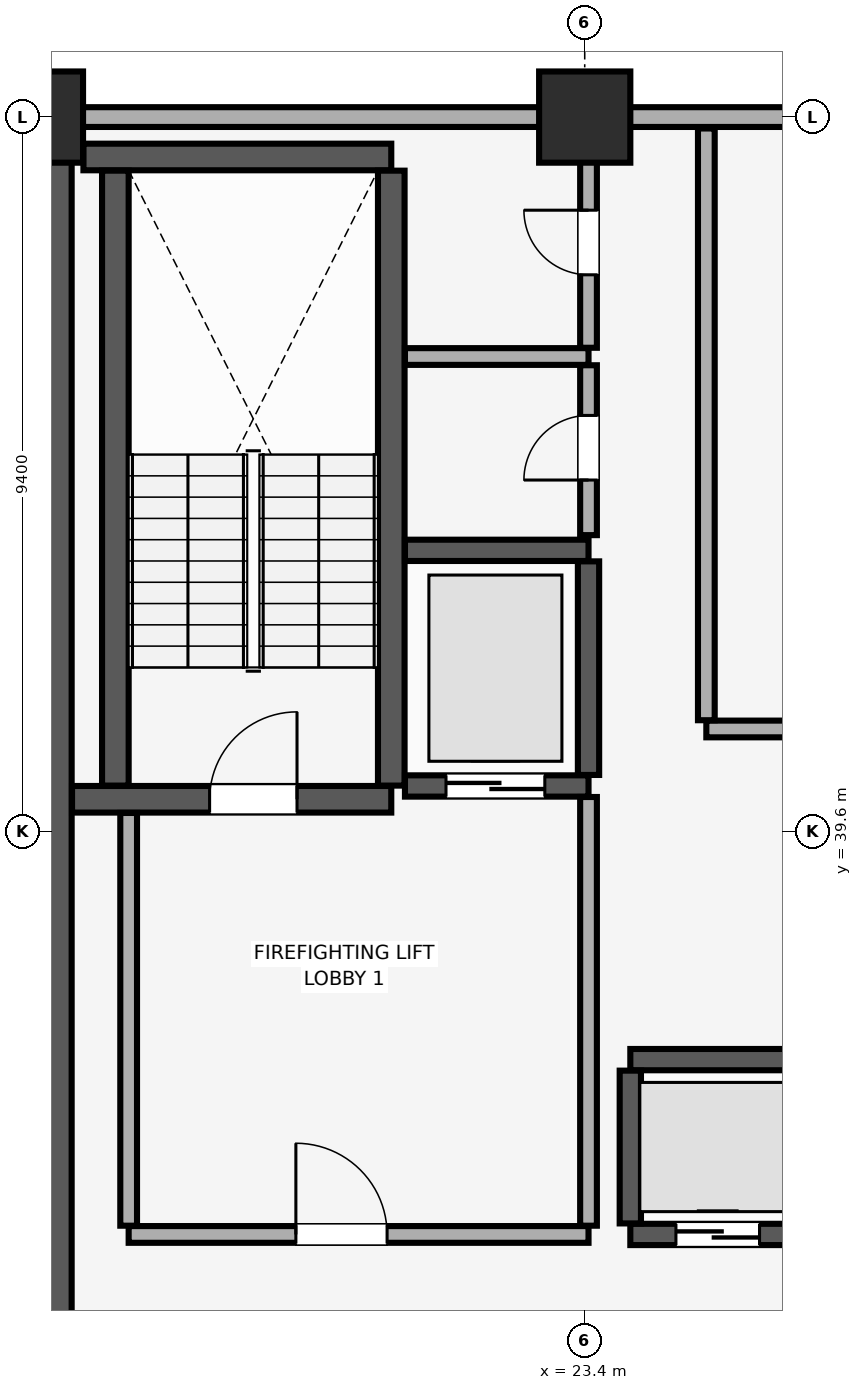
"""IFC4 building model, lengths in metres.
Left out: names, types, materials, properties, quantities, classifications, styles, units other than length and angle.
Written with IfcOpenShell. Run it as: python <this file> out.ifc"""

import sys

from ifc_helpers import new_model, si_unit, direction, frame, frame_2d, origin, origin_2d, place, context, subcontext, project, spatial, rectangle, extrude, element, fill, save


model = new_model("IFC4")
c1 = context("Model", 3, precision=1e-05, world=origin(), true_north=direction((0.0, 1.0)))
c2 = subcontext(c1, "Body", "Model", "MODEL_VIEW")
j1 = project(units=[si_unit("LENGTHUNIT", "METRE"), si_unit("PLANEANGLEUNIT", "RADIAN")], contexts=[c1])
p1 = place(None, origin())
s1 = spatial("IfcSite", under=j1, at=p1, CompositionType="ELEMENT")
p2 = place(p1, origin())
s2 = spatial("IfcBuilding", under=s1, at=p2, CompositionType="ELEMENT")
p3 = place(p2, frame((0.0, 0.0, 126.8)))
s3 = spatial("IfcBuildingStorey", under=s2, at=p3, CompositionType="ELEMENT", Elevation=126.8)
for number, where, z_axis, x_axis in (
    (1, (16.2, 49.0, 0.0), (0.0, 0.0, 1.0), (1.0, 0.0, 0.0)),
    (2, (23.4, 49.0, 0.0), (0.0, 0.0, 1.0), (1.0, 0.0, 0.0)),
):
    element("IfcColumn", number, at=place(p3, frame(where, z_axis=z_axis, x_axis=x_axis)), inside=s3, PredefinedType="COLUMN", context=c2, shape_type="SweptSolid", body=[
        extrude(rectangle(XDim=1.2, YDim=1.2, at=origin_2d()), origin(), (0.0, 0.0, 1.0), 3.51),
    ])
p4 = place(p3, frame((79.8, 49.0, 0.0), z_axis=(0.0, 0.0, 1.0), x_axis=(-1.0, 0.0, 0.0)))
e3 = element("IfcWall", 3, at=p4, inside=s3, PredefinedType="SOLIDWALL", context=c2, shape_type="SweptSolid", body=[
    extrude(rectangle(XDim=75.6, YDim=0.26, at=frame_2d((37.8, 0.0))), origin(), (0.0, 0.0, 1.0), 2.56),
])
p5 = place(p4, frame((72.565, 0.0, 0.85)))
e4 = element("IfcOpeningElement", 4, at=p5, cuts=e3, PredefinedType="OPENING", context=c2, shape_type="SweptSolid", body=[
    extrude(rectangle(XDim=1.5, YDim=1.4, at=frame_2d((0.75, 0.7))), frame((0.0, 0.14, 0.0), z_axis=(0.0, -1.0, 0.0), x_axis=(1.0, 0.0, 0.0)), (0.0, 0.0, 1.0), 0.28),
])
p6 = place(p4, frame((67.45, 0.0, 0.85)))
e5 = element("IfcOpeningElement", 5, at=p6, cuts=e3, PredefinedType="OPENING", context=c2, shape_type="SweptSolid", body=[
    extrude(rectangle(XDim=1.5, YDim=1.4, at=frame_2d((0.75, 0.7))), frame((0.0, 0.14, 0.0), z_axis=(0.0, -1.0, 0.0), x_axis=(1.0, 0.0, 0.0)), (0.0, 0.0, 1.0), 0.28),
])
p7 = place(p4, frame((7.6, 0.0, 0.85)))
e6 = element("IfcOpeningElement", 6, at=p7, cuts=e3, PredefinedType="OPENING", context=c2, shape_type="SweptSolid", body=[
    extrude(rectangle(XDim=1.5, YDim=1.4, at=frame_2d((0.75, 0.7))), frame((0.0, 0.14, 0.0), z_axis=(0.0, -1.0, 0.0), x_axis=(1.0, 0.0, 0.0)), (0.0, 0.0, 1.0), 0.28),
])
p8 = place(p4, frame((1.535, 0.0, 0.85)))
e7 = element("IfcOpeningElement", 7, at=p8, cuts=e3, PredefinedType="OPENING", context=c2, shape_type="SweptSolid", body=[
    extrude(rectangle(XDim=1.5, YDim=1.4, at=frame_2d((0.75, 0.7))), frame((0.0, 0.14, 0.0), z_axis=(0.0, -1.0, 0.0), x_axis=(1.0, 0.0, 0.0)), (0.0, 0.0, 1.0), 0.28),
])
p9 = place(p4, frame((52.265, 0.0, 0.9)))
e8 = element("IfcOpeningElement", 8, at=p9, cuts=e3, PredefinedType="OPENING", context=c2, shape_type="SweptSolid", body=[
    extrude(rectangle(XDim=1.5, YDim=1.4, at=frame_2d((0.75, 0.7))), frame((0.0, 0.14, 0.0), z_axis=(0.0, -1.0, 0.0), x_axis=(1.0, 0.0, 0.0)), (0.0, 0.0, 1.0), 0.28),
])
p10 = place(p4, frame((45.5, 0.0, 0.9)))
e9 = element("IfcOpeningElement", 9, at=p10, cuts=e3, PredefinedType="OPENING", context=c2, shape_type="SweptSolid", body=[
    extrude(rectangle(XDim=1.5, YDim=1.4, at=frame_2d((0.75, 0.7))), frame((0.0, 0.14, 0.0), z_axis=(0.0, -1.0, 0.0), x_axis=(1.0, 0.0, 0.0)), (0.0, 0.0, 1.0), 0.28),
])
p11 = place(p4, frame((31.05, 0.0, 0.9)))
e10 = element("IfcOpeningElement", 10, at=p11, cuts=e3, PredefinedType="OPENING", context=c2, shape_type="SweptSolid", body=[
    extrude(rectangle(XDim=1.5, YDim=1.4, at=frame_2d((0.75, 0.7))), frame((0.0, 0.14, 0.0), z_axis=(0.0, -1.0, 0.0), x_axis=(1.0, 0.0, 0.0)), (0.0, 0.0, 1.0), 0.28),
])
p12 = place(p4, frame((27.85, 0.0, 0.9)))
e11 = element("IfcOpeningElement", 11, at=p12, cuts=e3, PredefinedType="OPENING", context=c2, shape_type="SweptSolid", body=[
    extrude(rectangle(XDim=1.5, YDim=1.4, at=frame_2d((0.75, 0.7))), frame((0.0, 0.14, 0.0), z_axis=(0.0, -1.0, 0.0), x_axis=(1.0, 0.0, 0.0)), (0.0, 0.0, 1.0), 0.28),
])
p13 = place(p4, frame((23.485, 0.0, 0.9)))
e12 = element("IfcOpeningElement", 12, at=p13, cuts=e3, PredefinedType="OPENING", context=c2, shape_type="SweptSolid", body=[
    extrude(rectangle(XDim=1.5, YDim=1.4, at=frame_2d((0.75, 0.7))), frame((0.0, 0.14, 0.0), z_axis=(0.0, -1.0, 0.0), x_axis=(1.0, 0.0, 0.0)), (0.0, 0.0, 1.0), 0.28),
])
p14 = place(p3, frame((16.2, 29.4, 0.0), z_axis=(0.0, 0.0, 1.0), x_axis=(0.0, 1.0, 0.0)))
e13 = element("IfcWall", 13, at=p14, inside=s3, PredefinedType="SHEAR", context=c2, shape_type="SweptSolid", body=[
    extrude(rectangle(XDim=19.2, YDim=0.9, at=frame_2d((9.6, 0.0))), origin(), (0.0, 0.0, 1.0), 3.51),
])
p15 = place(p3, frame((16.655, 40.025, 0.0), z_axis=(0.0, 0.0, 1.0), x_axis=(1.0, 0.0, 0.0)))
e14 = element("IfcWall", 14, at=p15, inside=s3, PredefinedType="SHEAR", context=c2, shape_type="SweptSolid", body=[
    extrude(rectangle(XDim=4.2, YDim=0.35, at=frame_2d((2.1, 0.0))), origin(), (0.0, 0.0, 1.0), 3.51),
])
p16 = place(p15, frame((1.81, 0.0, 0.0)))
e15 = element("IfcOpeningElement", 15, at=p16, cuts=e14, PredefinedType="OPENING", context=c2, shape_type="SweptSolid", body=[
    extrude(rectangle(XDim=1.15, YDim=2.15, at=frame_2d((0.575, 1.075))), frame((0.0, 0.185, 0.0), z_axis=(0.0, -1.0, 0.0), x_axis=(1.0, 0.0, 0.0)), (0.0, 0.0, 1.0), 0.37),
])
p17 = place(p3, frame((16.805, 48.475, 0.0), z_axis=(0.0, 0.0, 1.0), x_axis=(1.0, 0.0, 0.0)))
e16 = element("IfcWall", 16, at=p17, inside=s3, PredefinedType="SHEAR", context=c2, shape_type="SweptSolid", body=[
    extrude(rectangle(XDim=4.05, YDim=0.35, at=frame_2d((2.025, 0.0))), origin(), (0.0, 0.0, 1.0), 3.51),
])
for number, where, z_axis, x_axis in (
    (17, (17.225, 40.205, 0.0), (0.0, 0.0, 1.0), (0.0, 1.0, 0.0)),
    (18, (20.855, 40.205, 0.0), (0.0, 0.0, 1.0), (0.0, 1.0, 0.0)),
):
    element("IfcWall", number, at=place(p3, frame(where, z_axis=z_axis, x_axis=x_axis)), inside=s3, PredefinedType="SHEAR", context=c2, shape_type="SweptSolid", body=[
        extrude(rectangle(XDim=8.09, YDim=0.35, at=frame_2d((4.045, 0.0))), origin(), (0.0, 0.0, 1.0), 3.51),
    ])
p18 = place(p3, frame((24.0, 34.3, 0.0), z_axis=(0.0, 0.0, 1.0), x_axis=(1.0, 0.0, 0.0)))
e19 = element("IfcWall", 19, at=p18, inside=s3, PredefinedType="SHEAR", context=c2, shape_type="SweptSolid", body=[
    extrude(rectangle(XDim=2.3, YDim=0.28, at=frame_2d((1.15, 0.0))), origin(), (0.0, 0.0, 1.0), 3.51),
])
p19 = place(p18, frame((0.6, 0.0, 0.0)))
e20 = element("IfcOpeningElement", 20, at=p19, cuts=e19, PredefinedType="OPENING", context=c2, shape_type="SweptSolid", body=[
    extrude(rectangle(XDim=1.1, YDim=2.2, at=frame_2d((0.55, 1.1))), frame((0.0, 0.15, 0.0), z_axis=(0.0, -1.0, 0.0), x_axis=(1.0, 0.0, 0.0)), (0.0, 0.0, 1.0), 0.3),
])
p20 = place(p3, frame((24.0, 36.6, 0.0), z_axis=(0.0, 0.0, 1.0), x_axis=(1.0, 0.0, 0.0)))
e21 = element("IfcWall", 21, at=p20, inside=s3, PredefinedType="SHEAR", context=c2, shape_type="SweptSolid", body=[
    extrude(rectangle(XDim=2.3, YDim=0.28, at=frame_2d((1.15, 0.0))), origin(), (0.0, 0.0, 1.0), 3.51),
])
p21 = place(p3, frame((24.0, 34.445, 0.0), z_axis=(0.0, 0.0, 1.0), x_axis=(0.0, 1.0, 0.0)))
e22 = element("IfcWall", 22, at=p21, inside=s3, PredefinedType="SHEAR", context=c2, shape_type="SweptSolid", body=[
    extrude(rectangle(XDim=2.01, YDim=0.28, at=frame_2d((1.005, 0.0))), origin(), (0.0, 0.0, 1.0), 3.51),
])
p22 = place(p3, frame((21.035, 40.2, 0.0), z_axis=(0.0, 0.0, 1.0), x_axis=(1.0, 0.0, 0.0)))
e23 = element("IfcWall", 23, at=p22, inside=s3, PredefinedType="SHEAR", context=c2, shape_type="SweptSolid", body=[
    extrude(rectangle(XDim=2.415, YDim=0.28, at=frame_2d((1.208, 0.0))), origin(), (0.0, 0.0, 1.0), 3.51),
])
p23 = place(p22, frame((0.54, 0.0, 0.0)))
e24 = element("IfcOpeningElement", 24, at=p23, cuts=e23, PredefinedType="OPENING", context=c2, shape_type="SweptSolid", body=[
    extrude(rectangle(XDim=1.3, YDim=2.3, at=frame_2d((0.65, 1.15))), frame((0.0, 0.15, 0.0), z_axis=(0.0, -1.0, 0.0), x_axis=(1.0, 0.0, 0.0)), (0.0, 0.0, 1.0), 0.3),
])
p24 = place(p3, frame((21.035, 43.3, 0.0), z_axis=(0.0, 0.0, 1.0), x_axis=(1.0, 0.0, 0.0)))
e25 = element("IfcWall", 25, at=p24, inside=s3, PredefinedType="SHEAR", context=c2, shape_type="SweptSolid", body=[
    extrude(rectangle(XDim=2.415, YDim=0.28, at=frame_2d((1.208, 0.0))), origin(), (0.0, 0.0, 1.0), 3.51),
])
p25 = place(p3, frame((23.45, 40.345, 0.0), z_axis=(0.0, 0.0, 1.0), x_axis=(0.0, 1.0, 0.0)))
e26 = element("IfcWall", 26, at=p25, inside=s3, PredefinedType="SHEAR", context=c2, shape_type="SweptSolid", body=[
    extrude(rectangle(XDim=2.81, YDim=0.28, at=frame_2d((1.405, 0.0))), origin(), (0.0, 0.0, 1.0), 3.51),
])
p26 = place(p3, frame((17.4, 34.3, 0.0), z_axis=(0.0, 0.0, 1.0), x_axis=(1.0, 0.0, 0.0)))
e27 = element("IfcWall", 27, at=p26, inside=s3, PredefinedType="PARTITIONING", context=c2, shape_type="SweptSolid", body=[
    extrude(rectangle(XDim=6.05, YDim=0.22, at=frame_2d((3.025, 0.0))), origin(), (0.0, 0.0, 1.0), 3.51),
])
p27 = place(p26, frame((2.2, 0.0, 0.0)))
e28 = element("IfcOpeningElement", 28, at=p27, cuts=e27, PredefinedType="OPENING", context=c2, shape_type="SweptSolid", body=[
    extrude(rectangle(XDim=1.2, YDim=2.15, at=frame_2d((0.6, 1.075))), frame((0.0, 0.12, 0.0), z_axis=(0.0, -1.0, 0.0), x_axis=(1.0, 0.0, 0.0)), (0.0, 0.0, 1.0), 0.24),
])
p28 = place(p3, frame((17.4, 34.415, 0.0), z_axis=(0.0, 0.0, 1.0), x_axis=(0.0, 1.0, 0.0)))
e29 = element("IfcWall", 29, at=p28, inside=s3, PredefinedType="PARTITIONING", context=c2, shape_type="SweptSolid", body=[
    extrude(rectangle(XDim=5.43, YDim=0.22, at=frame_2d((2.715, 0.0))), origin(), (0.0, 0.0, 1.0), 3.51),
])
p29 = place(p3, frame((23.45, 34.415, 0.0), z_axis=(0.0, 0.0, 1.0), x_axis=(0.0, 1.0, 0.0)))
e30 = element("IfcWall", 30, at=p29, inside=s3, PredefinedType="PARTITIONING", context=c2, shape_type="SweptSolid", body=[
    extrude(rectangle(XDim=5.64, YDim=0.22, at=frame_2d((2.82, 0.0))), origin(), (0.0, 0.0, 1.0), 3.51),
])
p30 = place(p3, frame((21.035, 45.85, 0.0), z_axis=(0.0, 0.0, 1.0), x_axis=(1.0, 0.0, 0.0)))
e31 = element("IfcWall", 31, at=p30, inside=s3, PredefinedType="PARTITIONING", context=c2, shape_type="SweptSolid", body=[
    extrude(rectangle(XDim=2.415, YDim=0.22, at=frame_2d((1.208, 0.0))), origin(), (0.0, 0.0, 1.0), 3.51),
])
p31 = place(p3, frame((23.45, 43.5, 0.0), z_axis=(0.0, 0.0, 1.0), x_axis=(0.0, 1.0, 0.0)))
e32 = element("IfcWall", 32, at=p31, inside=s3, PredefinedType="PARTITIONING", context=c2, shape_type="SweptSolid", body=[
    extrude(rectangle(XDim=2.235, YDim=0.22, at=frame_2d((1.118, 0.0))), origin(), (0.0, 0.0, 1.0), 3.51),
])
p32 = place(p31, frame((0.725, 0.0, 0.0)))
e33 = element("IfcOpeningElement", 33, at=p32, cuts=e32, PredefinedType="OPENING", context=c2, shape_type="SweptSolid", body=[
    extrude(rectangle(XDim=0.85, YDim=2.1, at=frame_2d((0.425, 1.05))), frame((0.0, 0.12, 0.0), z_axis=(0.0, -1.0, 0.0), x_axis=(1.0, 0.0, 0.0)), (0.0, 0.0, 1.0), 0.24),
])
p33 = place(p3, frame((23.45, 45.965, 0.0), z_axis=(0.0, 0.0, 1.0), x_axis=(0.0, 1.0, 0.0)))
e34 = element("IfcWall", 34, at=p33, inside=s3, PredefinedType="PARTITIONING", context=c2, shape_type="SweptSolid", body=[
    extrude(rectangle(XDim=2.885, YDim=0.22, at=frame_2d((1.442, 0.0))), origin(), (0.0, 0.0, 1.0), 3.51),
])
p34 = place(p33, frame((0.96, 0.0, 0.0)))
e35 = element("IfcOpeningElement", 35, at=p34, cuts=e34, PredefinedType="OPENING", context=c2, shape_type="SweptSolid", body=[
    extrude(rectangle(XDim=0.85, YDim=2.1, at=frame_2d((0.425, 1.05))), frame((0.0, 0.12, 0.0), z_axis=(0.0, -1.0, 0.0), x_axis=(1.0, 0.0, 0.0)), (0.0, 0.0, 1.0), 0.24),
])
p35 = place(p3, frame((25.0, 40.95, 0.0), z_axis=(0.0, 0.0, 1.0), x_axis=(1.0, 0.0, 0.0)))
e36 = element("IfcWall", 36, at=p35, inside=s3, PredefinedType="PARTITIONING", context=c2, shape_type="SweptSolid", body=[
    extrude(rectangle(XDim=3.4, YDim=0.22, at=frame_2d((1.7, 0.0))), origin(), (0.0, 0.0, 1.0), 3.51),
])
p36 = place(p35, frame((1.275, 0.0, 0.0)))
e37 = element("IfcOpeningElement", 37, at=p36, cuts=e36, PredefinedType="OPENING", context=c2, shape_type="SweptSolid", body=[
    extrude(rectangle(XDim=0.85, YDim=2.1, at=frame_2d((0.425, 1.05))), frame((0.0, 0.12, 0.0), z_axis=(0.0, -1.0, 0.0), x_axis=(1.0, 0.0, 0.0)), (0.0, 0.0, 1.0), 0.24),
])
p37 = place(p3, frame((25.0, 41.065, 0.0), z_axis=(0.0, 0.0, 1.0), x_axis=(0.0, 1.0, 0.0)))
e38 = element("IfcWall", 38, at=p37, inside=s3, PredefinedType="PARTITIONING", context=c2, shape_type="SweptSolid", body=[
    extrude(rectangle(XDim=7.785, YDim=0.22, at=frame_2d((3.893, 0.0))), origin(), (0.0, 0.0, 1.0), 3.51),
])
p38 = place(p16, origin())
e39 = element("IfcDoor", 39, at=p38, inside=s3, OperationType="SINGLE_SWING_RIGHT", PredefinedType="DOOR", context=c2, shape_type="SweptSolid", body=[
    extrude(rectangle(XDim=1.15, YDim=2.15, at=frame_2d((0.575, 1.075))), frame((0.0, 0.025, 0.0), z_axis=(0.0, -1.0, 0.0), x_axis=(1.0, 0.0, 0.0)), (0.0, 0.0, 1.0), 0.05),
])
fill(e15, e39)
p39 = place(p19, origin())
e40 = element("IfcDoor", 40, at=p39, inside=s3, OperationType="DOUBLE_DOOR_SLIDING", PredefinedType="DOOR", context=c2, shape_type="SweptSolid", body=[
    extrude(rectangle(XDim=1.1, YDim=2.2, at=frame_2d((0.55, 1.1))), frame((0.0, 0.025, 0.0), z_axis=(0.0, -1.0, 0.0), x_axis=(1.0, 0.0, 0.0)), (0.0, 0.0, 1.0), 0.05),
])
fill(e20, e40)
p40 = place(p23, origin())
e41 = element("IfcDoor", 41, at=p40, inside=s3, OperationType="DOUBLE_DOOR_SLIDING", PredefinedType="DOOR", context=c2, shape_type="SweptSolid", body=[
    extrude(rectangle(XDim=1.3, YDim=2.3, at=frame_2d((0.65, 1.15))), frame((0.0, 0.025, 0.0), z_axis=(0.0, -1.0, 0.0), x_axis=(1.0, 0.0, 0.0)), (0.0, 0.0, 1.0), 0.05),
])
fill(e24, e41)
p41 = place(p27, origin())
e42 = element("IfcDoor", 42, at=p41, inside=s3, OperationType="SINGLE_SWING_LEFT", PredefinedType="DOOR", context=c2, shape_type="SweptSolid", body=[
    extrude(rectangle(XDim=1.2, YDim=2.15, at=frame_2d((0.6, 1.075))), frame((0.0, 0.025, 0.0), z_axis=(0.0, -1.0, 0.0), x_axis=(1.0, 0.0, 0.0)), (0.0, 0.0, 1.0), 0.05),
])
fill(e28, e42)
p42 = place(p32, origin())
e43 = element("IfcDoor", 43, at=p42, inside=s3, OperationType="SINGLE_SWING_LEFT", PredefinedType="DOOR", context=c2, shape_type="SweptSolid", body=[
    extrude(rectangle(XDim=0.85, YDim=2.1, at=frame_2d((0.425, 1.05))), frame((0.0, 0.025, 0.0), z_axis=(0.0, -1.0, 0.0), x_axis=(1.0, 0.0, 0.0)), (0.0, 0.0, 1.0), 0.05),
])
fill(e33, e43)
p43 = place(p34, origin())
e44 = element("IfcDoor", 44, at=p43, inside=s3, OperationType="SINGLE_SWING_RIGHT", PredefinedType="DOOR", context=c2, shape_type="SweptSolid", body=[
    extrude(rectangle(XDim=0.85, YDim=2.1, at=frame_2d((0.425, 1.05))), frame((0.0, 0.025, 0.0), z_axis=(0.0, -1.0, 0.0), x_axis=(1.0, 0.0, 0.0)), (0.0, 0.0, 1.0), 0.05),
])
fill(e35, e44)
save(model, sys.argv[1])
